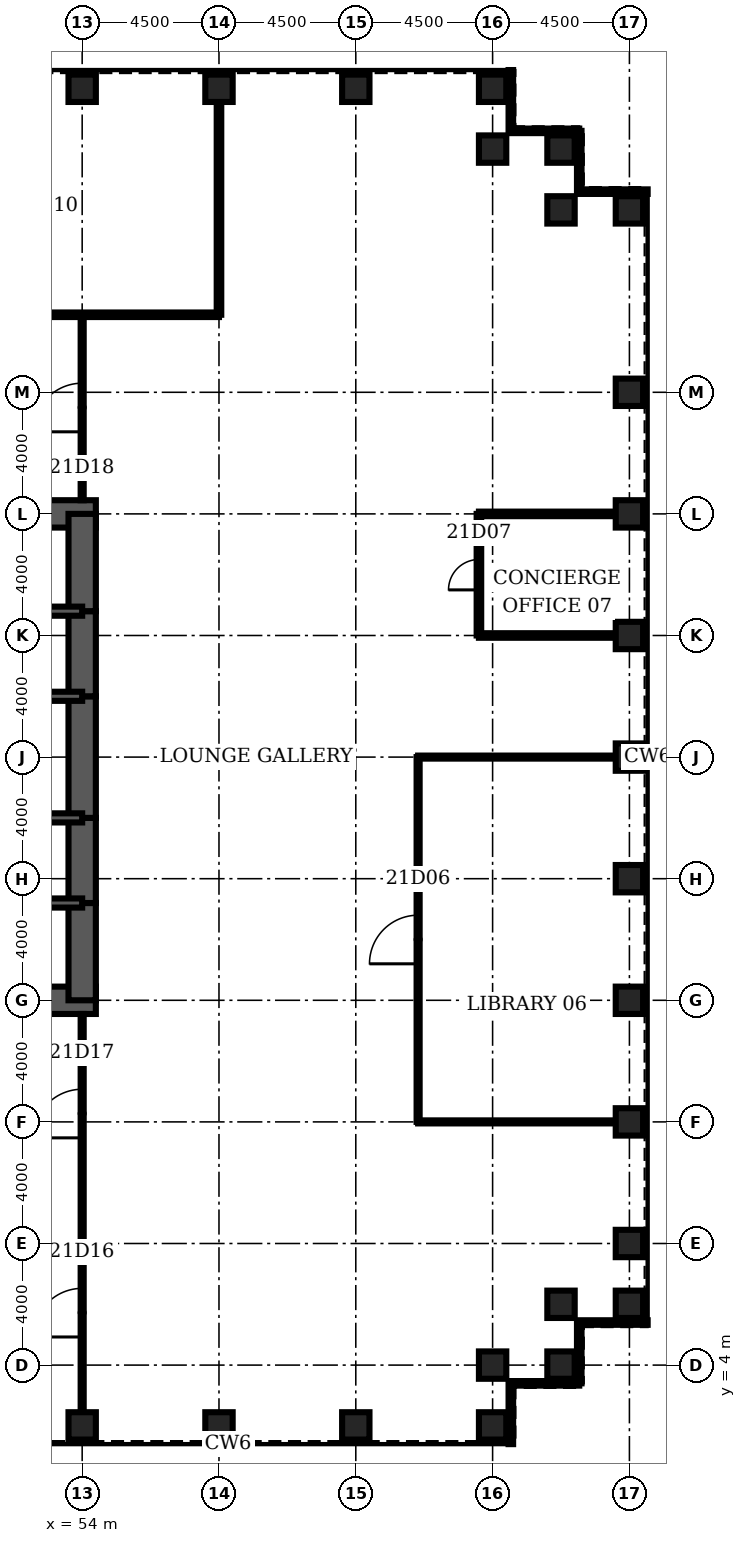
"""IFC4 building model, lengths in metres.
Left out: names, types, materials, properties, quantities, classifications, styles, units other than length and angle.
Written with IfcOpenShell. Run it as: python <this file> out.ifc"""

import sys

from ifc_helpers import new_model, si_unit, direction, frame, frame_2d, origin, origin_2d, place, context, subcontext, project, spatial, rectangle, hollow_rectangle, extrude, element, fill, save


model = new_model("IFC4")
c1 = context("Model", 3, precision=1e-05, world=origin(), true_north=direction((0.0, 1.0)))
c2 = subcontext(c1, "Body", "Model", "MODEL_VIEW")
j1 = project(units=[si_unit("LENGTHUNIT", "METRE"), si_unit("PLANEANGLEUNIT", "RADIAN")], contexts=[c1])
p1 = place(None, origin())
s1 = spatial("IfcSite", under=j1, at=p1, CompositionType="ELEMENT")
p2 = place(p1, origin())
s2 = spatial("IfcBuilding", under=s1, at=p2, CompositionType="ELEMENT")
p3 = place(p2, frame((0.0, 0.0, 100.5)))
s3 = spatial("IfcBuildingStorey", under=s2, at=p3, CompositionType="ELEMENT", Elevation=100.5)
for number, where, z_axis, x_axis in (
    (1, (54.0, 2.0, 0.0), (0.0, 0.0, 1.0), (0.0, 1.0, 0.0)),
    (2, (58.5, 2.0, 0.0), (0.0, 0.0, 1.0), (0.0, 1.0, 0.0)),
    (3, (63.0, 2.0, 0.0), (0.0, 0.0, 1.0), (0.0, 1.0, 0.0)),
    (4, (67.5, 2.0, 0.0), (0.0, 0.0, 1.0), (0.0, 1.0, 0.0)),
    (5, (67.5, 4.0, 0.0), (0.0, 0.0, 1.0), (0.0, 1.0, 0.0)),
    (6, (69.75, 4.0, 0.0), (0.0, 0.0, 1.0), (1.0, 0.0, 0.0)),
    (7, (69.75, 6.0, 0.0), (0.0, 0.0, 1.0), (1.0, 0.0, 0.0)),
    (8, (72.0, 6.0, 0.0), (0.0, 0.0, 1.0), (1.0, 0.0, 0.0)),
    (9, (72.0, 8.0, 0.0), (0.0, 0.0, 1.0), (1.0, 0.0, 0.0)),
    (10, (72.0, 12.0, 0.0), (0.0, 0.0, 1.0), (1.0, 0.0, 0.0)),
    (11, (72.0, 16.0, 0.0), (0.0, 0.0, 1.0), (1.0, 0.0, 0.0)),
    (12, (72.0, 20.0, 0.0), (0.0, 0.0, 1.0), (1.0, 0.0, 0.0)),
    (13, (72.0, 24.0, 0.0), (0.0, 0.0, 1.0), (1.0, 0.0, 0.0)),
    (14, (72.0, 28.0, 0.0), (0.0, 0.0, 1.0), (1.0, 0.0, 0.0)),
    (15, (72.0, 32.0, 0.0), (0.0, 0.0, 1.0), (1.0, 0.0, 0.0)),
    (16, (72.0, 36.0, 0.0), (0.0, 0.0, 1.0), (1.0, 0.0, 0.0)),
    (17, (72.0, 42.0, 0.0), (0.0, 0.0, 1.0), (1.0, 0.0, 0.0)),
    (18, (69.75, 42.0, 0.0), (0.0, 0.0, 1.0), (1.0, 0.0, 0.0)),
    (19, (69.75, 44.0, 0.0), (0.0, 0.0, 1.0), (1.0, 0.0, 0.0)),
    (20, (67.5, 44.0, 0.0), (0.0, 0.0, 1.0), (0.0, 1.0, 0.0)),
    (21, (67.5, 46.0, 0.0), (0.0, 0.0, 1.0), (0.0, 1.0, 0.0)),
    (22, (63.0, 46.0, 0.0), (0.0, 0.0, 1.0), (0.0, 1.0, 0.0)),
    (23, (58.5, 46.0, 0.0), (0.0, 0.0, 1.0), (0.0, 1.0, 0.0)),
    (24, (54.0, 46.0, 0.0), (0.0, 0.0, 1.0), (0.0, 1.0, 0.0)),
):
    element("IfcColumn", number, at=place(p3, frame(where, z_axis=z_axis, x_axis=x_axis)), inside=s3, PredefinedType="COLUMN", context=c2, shape_type="SweptSolid", body=[
        extrude(hollow_rectangle(XDim=0.9, YDim=0.9, WallThickness=0.11, at=origin_2d()), origin(), (0.0, 0.0, 1.0), 4.2),
    ])
for number, where, z_axis, x_axis in (
    (25, (45.0, 16.0, 0.0), (0.0, 0.0, 1.0), (1.0, 0.0, 0.0)),
    (26, (54.45, 32.0, 0.0), (0.0, 0.0, 1.0), (-1.0, 0.0, 0.0)),
):
    element("IfcWall", number, at=place(p3, frame(where, z_axis=z_axis, x_axis=x_axis)), inside=s3, PredefinedType="SHEAR", context=c2, shape_type="SweptSolid", body=[
        extrude(rectangle(XDim=9.45, YDim=0.9, at=frame_2d((4.725, 0.0))), origin(), (0.0, 0.0, 1.0), 4.2),
    ])
p4 = place(p3, frame((54.0, 16.0, 0.0), z_axis=(0.0, 0.0, 1.0), x_axis=(0.0, 1.0, 0.0)))
e27 = element("IfcWall", 27, at=p4, inside=s3, PredefinedType="SHEAR", context=c2, shape_type="SweptSolid", body=[
    extrude(rectangle(XDim=3.2, YDim=0.9, at=frame_2d((1.6, 0.0))), origin(), (0.0, 0.0, 1.0), 4.2),
])
p5 = place(p3, frame((54.0, 19.2, 0.0), z_axis=(0.0, 0.0, 1.0), x_axis=(0.0, 1.0, 0.0)))
e28 = element("IfcWall", 28, at=p5, inside=s3, PredefinedType="SHEAR", context=c2, shape_type="SweptSolid", body=[
    extrude(rectangle(XDim=2.8, YDim=0.9, at=frame_2d((1.4, 0.0))), origin(), (0.0, 0.0, 1.0), 4.2),
])
p6 = place(p5, frame((0.4, 0.0, 0.0)))
e29 = element("IfcOpeningElement", 29, at=p6, cuts=e28, PredefinedType="OPENING", context=c2, shape_type="SweptSolid", body=[
    extrude(rectangle(XDim=1.8, YDim=2.1, at=frame_2d((0.9, 1.05))), frame((0.0, 0.46, 0.0), z_axis=(0.0, -1.0, 0.0), x_axis=(1.0, 0.0, 0.0)), (0.0, 0.0, 1.0), 0.92),
])
p7 = place(p3, frame((54.0, 22.0, 0.0), z_axis=(0.0, 0.0, 1.0), x_axis=(0.0, 1.0, 0.0)))
e30 = element("IfcWall", 30, at=p7, inside=s3, PredefinedType="SHEAR", context=c2, shape_type="SweptSolid", body=[
    extrude(rectangle(XDim=4.0, YDim=0.9, at=frame_2d((2.0, 0.0))), origin(), (0.0, 0.0, 1.0), 4.2),
])
p8 = place(p3, frame((54.0, 26.0, 0.0), z_axis=(0.0, 0.0, 1.0), x_axis=(0.0, 1.0, 0.0)))
e31 = element("IfcWall", 31, at=p8, inside=s3, PredefinedType="SHEAR", context=c2, shape_type="SweptSolid", body=[
    extrude(rectangle(XDim=2.8, YDim=0.9, at=frame_2d((1.4, 0.0))), origin(), (0.0, 0.0, 1.0), 4.2),
])
p9 = place(p8, frame((0.6, 0.0, 0.0)))
e32 = element("IfcOpeningElement", 32, at=p9, cuts=e31, PredefinedType="OPENING", context=c2, shape_type="SweptSolid", body=[
    extrude(rectangle(XDim=1.8, YDim=2.1, at=frame_2d((0.9, 1.05))), frame((0.0, 0.46, 0.0), z_axis=(0.0, -1.0, 0.0), x_axis=(1.0, 0.0, 0.0)), (0.0, 0.0, 1.0), 0.92),
])
p10 = place(p3, frame((54.0, 28.8, 0.0), z_axis=(0.0, 0.0, 1.0), x_axis=(0.0, 1.0, 0.0)))
e33 = element("IfcWall", 33, at=p10, inside=s3, PredefinedType="SHEAR", context=c2, shape_type="SweptSolid", body=[
    extrude(rectangle(XDim=3.2, YDim=0.9, at=frame_2d((1.6, 0.0))), origin(), (0.0, 0.0, 1.0), 4.2),
])
p11 = place(p3, frame((45.0, 19.2, 0.0), z_axis=(0.0, 0.0, 1.0), x_axis=(1.0, 0.0, 0.0)))
e34 = element("IfcWall", 34, at=p11, inside=s3, PredefinedType="SOLIDWALL", context=c2, shape_type="SweptSolid", body=[
    extrude(rectangle(XDim=9.0, YDim=0.3, at=frame_2d((4.5, 0.0))), origin(), (0.0, 0.0, 1.0), 4.2),
])
p12 = place(p11, frame((7.35, 0.0, 0.0)))
e35 = element("IfcOpeningElement", 35, at=p12, cuts=e34, PredefinedType="OPENING", context=c2, shape_type="SweptSolid", body=[
    extrude(rectangle(XDim=1.0, YDim=2.1, at=frame_2d((0.5, 1.05))), frame((0.0, 0.16, 0.0), z_axis=(0.0, -1.0, 0.0), x_axis=(1.0, 0.0, 0.0)), (0.0, 0.0, 1.0), 0.32),
])
p13 = place(p3, frame((45.0, 28.8, 0.0), z_axis=(0.0, 0.0, 1.0), x_axis=(1.0, 0.0, 0.0)))
e36 = element("IfcWall", 36, at=p13, inside=s3, PredefinedType="SOLIDWALL", context=c2, shape_type="SweptSolid", body=[
    extrude(rectangle(XDim=9.0, YDim=0.3, at=frame_2d((4.5, 0.0))), origin(), (0.0, 0.0, 1.0), 4.2),
])
p14 = place(p13, frame((7.35, 0.0, 0.0)))
e37 = element("IfcOpeningElement", 37, at=p14, cuts=e36, PredefinedType="OPENING", context=c2, shape_type="SweptSolid", body=[
    extrude(rectangle(XDim=1.0, YDim=2.1, at=frame_2d((0.5, 1.05))), frame((0.0, 0.16, 0.0), z_axis=(0.0, -1.0, 0.0), x_axis=(1.0, 0.0, 0.0)), (0.0, 0.0, 1.0), 0.32),
])
p15 = place(p3, frame((48.0, 22.0, 0.0), z_axis=(0.0, 0.0, 1.0), x_axis=(1.0, 0.0, 0.0)))
e38 = element("IfcWall", 38, at=p15, inside=s3, PredefinedType="SOLIDWALL", context=c2, shape_type="SweptSolid", body=[
    extrude(rectangle(XDim=6.0, YDim=0.3, at=frame_2d((3.0, 0.0))), origin(), (0.0, 0.0, 1.0), 4.2),
])
p16 = place(p15, frame((2.0, 0.0, 0.0)))
e39 = element("IfcOpeningElement", 39, at=p16, cuts=e38, PredefinedType="OPENING", context=c2, shape_type="SweptSolid", body=[
    extrude(rectangle(XDim=1.0, YDim=2.1, at=frame_2d((0.5, 1.05))), frame((0.0, 0.16, 0.0), z_axis=(0.0, -1.0, 0.0), x_axis=(1.0, 0.0, 0.0)), (0.0, 0.0, 1.0), 0.32),
])
p17 = place(p15, frame((4.3, 0.0, 0.0)))
e40 = element("IfcOpeningElement", 40, at=p17, cuts=e38, PredefinedType="OPENING", context=c2, shape_type="SweptSolid", body=[
    extrude(rectangle(XDim=1.0, YDim=2.1, at=frame_2d((0.5, 1.05))), frame((0.0, 0.16, 0.0), z_axis=(0.0, -1.0, 0.0), x_axis=(1.0, 0.0, 0.0)), (0.0, 0.0, 1.0), 0.32),
])
p18 = place(p3, frame((48.0, 26.0, 0.0), z_axis=(0.0, 0.0, 1.0), x_axis=(1.0, 0.0, 0.0)))
e41 = element("IfcWall", 41, at=p18, inside=s3, PredefinedType="SOLIDWALL", context=c2, shape_type="SweptSolid", body=[
    extrude(rectangle(XDim=6.0, YDim=0.3, at=frame_2d((3.0, 0.0))), origin(), (0.0, 0.0, 1.0), 4.2),
])
for number, where, z_axis, x_axis in (
    (42, (65.05, 12.0, 0.0), (0.0, 0.0, 1.0), (1.0, 0.0, 0.0)),
    (43, (65.05, 24.0, 0.0), (0.0, 0.0, 1.0), (1.0, 0.0, 0.0)),
):
    element("IfcWall", number, at=place(p3, frame(where, z_axis=z_axis, x_axis=x_axis)), inside=s3, PredefinedType="PARTITIONING", context=c2, shape_type="SweptSolid", body=[
        extrude(rectangle(XDim=6.5, YDim=0.1, at=frame_2d((3.25, 0.0))), origin(), (0.0, 0.0, 1.0), 3.0),
    ])
for number, where, z_axis, x_axis in (
    (44, (67.05, 28.0, 0.0), (0.0, 0.0, 1.0), (1.0, 0.0, 0.0)),
    (45, (67.05, 32.0, 0.0), (0.0, 0.0, 1.0), (1.0, 0.0, 0.0)),
):
    element("IfcWall", number, at=place(p3, frame(where, z_axis=z_axis, x_axis=x_axis)), inside=s3, PredefinedType="PARTITIONING", context=c2, shape_type="SweptSolid", body=[
        extrude(rectangle(XDim=4.5, YDim=0.15, at=frame_2d((2.25, 0.0))), origin(), (0.0, 0.0, 1.0), 3.0),
    ])
p19 = place(p3, frame((45.0, 38.55, 0.0), z_axis=(0.0, 0.0, 1.0), x_axis=(1.0, 0.0, 0.0)))
e46 = element("IfcWall", 46, at=p19, inside=s3, PredefinedType="PARTITIONING", context=c2, shape_type="SweptSolid", body=[
    extrude(rectangle(XDim=13.5, YDim=0.15, at=frame_2d((6.75, 0.0))), origin(), (0.0, 0.0, 1.0), 3.0),
])
p20 = place(p19, frame((5.95, 0.0, 0.0)))
e47 = element("IfcOpeningElement", 47, at=p20, cuts=e46, PredefinedType="OPENING", context=c2, shape_type="SweptSolid", body=[
    extrude(rectangle(XDim=1.6, YDim=2.1, at=frame_2d((0.8, 1.05))), frame((0.0, 0.085, 0.0), z_axis=(0.0, -1.0, 0.0), x_axis=(1.0, 0.0, 0.0)), (0.0, 0.0, 1.0), 0.17),
])
p21 = place(p3, frame((54.0, 2.45, 0.0), z_axis=(0.0, 0.0, 1.0), x_axis=(0.0, 1.0, 0.0)))
e48 = element("IfcWall", 48, at=p21, inside=s3, PredefinedType="PARTITIONING", context=c2, shape_type="SweptSolid", body=[
    extrude(rectangle(XDim=13.1, YDim=0.1, at=frame_2d((6.55, 0.0))), origin(), (0.0, 0.0, 1.0), 3.0),
])
p22 = place(p21, frame((2.475, 0.0, 0.0)))
e49 = element("IfcOpeningElement", 49, at=p22, cuts=e48, PredefinedType="OPENING", context=c2, shape_type="SweptSolid", body=[
    extrude(rectangle(XDim=1.6, YDim=2.1, at=frame_2d((0.8, 1.05))), frame((0.0, 0.06, 0.0), z_axis=(0.0, -1.0, 0.0), x_axis=(1.0, 0.0, 0.0)), (0.0, 0.0, 1.0), 0.12),
])
p23 = place(p21, frame((9.025, 0.0, 0.0)))
e50 = element("IfcOpeningElement", 50, at=p23, cuts=e48, PredefinedType="OPENING", context=c2, shape_type="SweptSolid", body=[
    extrude(rectangle(XDim=1.6, YDim=2.1, at=frame_2d((0.8, 1.05))), frame((0.0, 0.06, 0.0), z_axis=(0.0, -1.0, 0.0), x_axis=(1.0, 0.0, 0.0)), (0.0, 0.0, 1.0), 0.12),
])
p24 = place(p3, frame((54.0, 32.45, 0.0), z_axis=(0.0, 0.0, 1.0), x_axis=(0.0, 1.0, 0.0)))
e51 = element("IfcWall", 51, at=p24, inside=s3, PredefinedType="PARTITIONING", context=c2, shape_type="SweptSolid", body=[
    extrude(rectangle(XDim=6.1, YDim=0.1, at=frame_2d((3.05, 0.0))), origin(), (0.0, 0.0, 1.0), 3.0),
])
p25 = place(p24, frame((2.25, 0.0, 0.0)))
e52 = element("IfcOpeningElement", 52, at=p25, cuts=e51, PredefinedType="OPENING", context=c2, shape_type="SweptSolid", body=[
    extrude(rectangle(XDim=1.6, YDim=2.1, at=frame_2d((0.8, 1.05))), frame((0.0, 0.06, 0.0), z_axis=(0.0, -1.0, 0.0), x_axis=(1.0, 0.0, 0.0)), (0.0, 0.0, 1.0), 0.12),
])
p26 = place(p3, frame((58.5, 38.55, 0.0), z_axis=(0.0, 0.0, 1.0), x_axis=(0.0, 1.0, 0.0)))
e53 = element("IfcWall", 53, at=p26, inside=s3, PredefinedType="PARTITIONING", context=c2, shape_type="SweptSolid", body=[
    extrude(rectangle(XDim=7.0, YDim=0.15, at=frame_2d((3.5, 0.0))), origin(), (0.0, 0.0, 1.0), 3.0),
])
p27 = place(p3, frame((65.05, 12.0, 0.0), z_axis=(0.0, 0.0, 1.0), x_axis=(0.0, 1.0, 0.0)))
e54 = element("IfcWall", 54, at=p27, inside=s3, PredefinedType="PARTITIONING", context=c2, shape_type="SweptSolid", body=[
    extrude(rectangle(XDim=12.0, YDim=0.1, at=frame_2d((6.0, 0.0))), origin(), (0.0, 0.0, 1.0), 3.0),
])
p28 = place(p27, frame((5.2, 0.0, 0.0)))
e55 = element("IfcOpeningElement", 55, at=p28, cuts=e54, PredefinedType="OPENING", context=c2, shape_type="SweptSolid", body=[
    extrude(rectangle(XDim=1.6, YDim=2.1, at=frame_2d((0.8, 1.05))), frame((0.0, 0.06, 0.0), z_axis=(0.0, -1.0, 0.0), x_axis=(1.0, 0.0, 0.0)), (0.0, 0.0, 1.0), 0.12),
])
p29 = place(p3, frame((67.05, 28.0, 0.0), z_axis=(0.0, 0.0, 1.0), x_axis=(0.0, 1.0, 0.0)))
e56 = element("IfcWall", 56, at=p29, inside=s3, PredefinedType="PARTITIONING", context=c2, shape_type="SweptSolid", body=[
    extrude(rectangle(XDim=4.0, YDim=0.15, at=frame_2d((2.0, 0.0))), origin(), (0.0, 0.0, 1.0), 3.0),
])
p30 = place(p29, frame((1.5, 0.0, 0.0)))
e57 = element("IfcOpeningElement", 57, at=p30, cuts=e56, PredefinedType="OPENING", context=c2, shape_type="SweptSolid", body=[
    extrude(rectangle(XDim=1.0, YDim=2.1, at=frame_2d((0.5, 1.05))), frame((0.0, 0.085, 0.0), z_axis=(0.0, -1.0, 0.0), x_axis=(1.0, 0.0, 0.0)), (0.0, 0.0, 1.0), 0.17),
])
p31 = place(p3, frame((68.1, 1.4, 0.0), z_axis=(0.0, 0.0, 1.0), x_axis=(0.0, 1.0, 0.0)))
e58 = element("IfcWall", 58, at=p31, inside=s3, PredefinedType="ELEMENTEDWALL", context=c2, shape_type="SweptSolid", body=[
    extrude(rectangle(XDim=2.0, YDim=0.15, at=frame_2d((1.0, 0.0))), origin(), (0.0, 0.0, 1.0), 4.04),
])
p32 = place(p3, frame((68.1, 3.4, 0.0), z_axis=(0.0, 0.0, 1.0), x_axis=(1.0, 0.0, 0.0)))
e59 = element("IfcWall", 59, at=p32, inside=s3, PredefinedType="ELEMENTEDWALL", context=c2, shape_type="SweptSolid", body=[
    extrude(rectangle(XDim=2.25, YDim=0.15, at=frame_2d((1.125, 0.0))), origin(), (0.0, 0.0, 1.0), 4.04),
])
p33 = place(p3, frame((70.35, 3.4, 0.0), z_axis=(0.0, 0.0, 1.0), x_axis=(0.0, 1.0, 0.0)))
e60 = element("IfcWall", 60, at=p33, inside=s3, PredefinedType="ELEMENTEDWALL", context=c2, shape_type="SweptSolid", body=[
    extrude(rectangle(XDim=2.0, YDim=0.15, at=frame_2d((1.0, 0.0))), origin(), (0.0, 0.0, 1.0), 4.04),
])
for number, where, z_axis, x_axis in (
    (61, (70.35, 5.4, 0.0), (0.0, 0.0, 1.0), (1.0, 0.0, 0.0)),
    (62, (72.6, 42.6, 0.0), (0.0, 0.0, 1.0), (-1.0, 0.0, 0.0)),
):
    element("IfcWall", number, at=place(p3, frame(where, z_axis=z_axis, x_axis=x_axis)), inside=s3, PredefinedType="ELEMENTEDWALL", context=c2, shape_type="SweptSolid", body=[
        extrude(rectangle(XDim=2.25, YDim=0.15, at=frame_2d((1.125, 0.0))), origin(), (0.0, 0.0, 1.0), 4.04),
    ])
p34 = place(p3, frame((70.35, 42.6, 0.0), z_axis=(0.0, 0.0, 1.0), x_axis=(0.0, 1.0, 0.0)))
e63 = element("IfcWall", 63, at=p34, inside=s3, PredefinedType="ELEMENTEDWALL", context=c2, shape_type="SweptSolid", body=[
    extrude(rectangle(XDim=2.0, YDim=0.15, at=frame_2d((1.0, 0.0))), origin(), (0.0, 0.0, 1.0), 4.04),
])
p35 = place(p3, frame((70.35, 44.6, 0.0), z_axis=(0.0, 0.0, 1.0), x_axis=(-1.0, 0.0, 0.0)))
e64 = element("IfcWall", 64, at=p35, inside=s3, PredefinedType="ELEMENTEDWALL", context=c2, shape_type="SweptSolid", body=[
    extrude(rectangle(XDim=2.25, YDim=0.15, at=frame_2d((1.125, 0.0))), origin(), (0.0, 0.0, 1.0), 4.04),
])
p36 = place(p3, frame((68.1, 44.6, 0.0), z_axis=(0.0, 0.0, 1.0), x_axis=(0.0, 1.0, 0.0)))
e65 = element("IfcWall", 65, at=p36, inside=s3, PredefinedType="ELEMENTEDWALL", context=c2, shape_type="SweptSolid", body=[
    extrude(rectangle(XDim=2.0, YDim=0.15, at=frame_2d((1.0, 0.0))), origin(), (0.0, 0.0, 1.0), 4.04),
])
p37 = place(p28, origin())
e66 = element("IfcDoor", 66, at=p37, inside=s3, OperationType="SINGLE_SWING_LEFT", PredefinedType="DOOR", context=c2, shape_type="SweptSolid", body=[
    extrude(rectangle(XDim=1.6, YDim=2.1, at=frame_2d((0.8, 1.05))), frame((0.0, 0.025, 0.0), z_axis=(0.0, -1.0, 0.0), x_axis=(1.0, 0.0, 0.0)), (0.0, 0.0, 1.0), 0.05),
])
fill(e55, e66)
p38 = place(p30, origin())
e67 = element("IfcDoor", 67, at=p38, inside=s3, OperationType="SINGLE_SWING_LEFT", PredefinedType="DOOR", context=c2, shape_type="SweptSolid", body=[
    extrude(rectangle(XDim=1.0, YDim=2.1, at=frame_2d((0.5, 1.05))), frame((0.0, 0.025, 0.0), z_axis=(0.0, -1.0, 0.0), x_axis=(1.0, 0.0, 0.0)), (0.0, 0.0, 1.0), 0.05),
])
fill(e57, e67)
p39 = place(p22, origin())
e68 = element("IfcDoor", 68, at=p39, inside=s3, OperationType="SINGLE_SWING_LEFT", PredefinedType="DOOR", context=c2, shape_type="SweptSolid", body=[
    extrude(rectangle(XDim=1.6, YDim=2.1, at=frame_2d((0.8, 1.05))), frame((0.0, 0.025, 0.0), z_axis=(0.0, -1.0, 0.0), x_axis=(1.0, 0.0, 0.0)), (0.0, 0.0, 1.0), 0.05),
])
fill(e49, e68)
p40 = place(p23, origin())
e69 = element("IfcDoor", 69, at=p40, inside=s3, OperationType="SINGLE_SWING_LEFT", PredefinedType="DOOR", context=c2, shape_type="SweptSolid", body=[
    extrude(rectangle(XDim=1.6, YDim=2.1, at=frame_2d((0.8, 1.05))), frame((0.0, 0.025, 0.0), z_axis=(0.0, -1.0, 0.0), x_axis=(1.0, 0.0, 0.0)), (0.0, 0.0, 1.0), 0.05),
])
fill(e50, e69)
p41 = place(p25, origin())
e70 = element("IfcDoor", 70, at=p41, inside=s3, OperationType="SINGLE_SWING_LEFT", PredefinedType="DOOR", context=c2, shape_type="SweptSolid", body=[
    extrude(rectangle(XDim=1.6, YDim=2.1, at=frame_2d((0.8, 1.05))), frame((0.0, 0.025, 0.0), z_axis=(0.0, -1.0, 0.0), x_axis=(1.0, 0.0, 0.0)), (0.0, 0.0, 1.0), 0.05),
])
fill(e52, e70)
p42 = place(p12, origin())
e71 = element("IfcDoor", 71, at=p42, inside=s3, OperationType="SINGLE_SWING_RIGHT", PredefinedType="DOOR", context=c2, shape_type="SweptSolid", body=[
    extrude(rectangle(XDim=1.0, YDim=2.1, at=frame_2d((0.5, 1.05))), frame((0.0, 0.025, 0.0), z_axis=(0.0, -1.0, 0.0), x_axis=(1.0, 0.0, 0.0)), (0.0, 0.0, 1.0), 0.05),
])
fill(e35, e71)
p43 = place(p14, origin())
e72 = element("IfcDoor", 72, at=p43, inside=s3, OperationType="SINGLE_SWING_RIGHT", PredefinedType="DOOR", context=c2, shape_type="SweptSolid", body=[
    extrude(rectangle(XDim=1.0, YDim=2.1, at=frame_2d((0.5, 1.05))), frame((0.0, 0.025, 0.0), z_axis=(0.0, -1.0, 0.0), x_axis=(1.0, 0.0, 0.0)), (0.0, 0.0, 1.0), 0.05),
])
fill(e37, e72)
p44 = place(p6, origin())
e73 = element("IfcDoor", 73, at=p44, inside=s3, OperationType="SINGLE_SWING_LEFT", PredefinedType="DOOR", context=c2, shape_type="SweptSolid", body=[
    extrude(rectangle(XDim=1.8, YDim=2.1, at=frame_2d((0.9, 1.05))), frame((0.0, 0.45, 0.0), z_axis=(0.0, -1.0, 0.0), x_axis=(1.0, 0.0, 0.0)), (0.0, 0.0, 1.0), 0.899),
])
fill(e29, e73)
p45 = place(p9, origin())
e74 = element("IfcDoor", 74, at=p45, inside=s3, OperationType="SINGLE_SWING_LEFT", PredefinedType="DOOR", context=c2, shape_type="SweptSolid", body=[
    extrude(rectangle(XDim=1.8, YDim=2.1, at=frame_2d((0.9, 1.05))), frame((0.0, 0.45, 0.0), z_axis=(0.0, -1.0, 0.0), x_axis=(1.0, 0.0, 0.0)), (0.0, 0.0, 1.0), 0.899),
])
fill(e32, e74)
p46 = place(p17, origin())
e75 = element("IfcDoor", 75, at=p46, inside=s3, OperationType="SINGLE_SWING_RIGHT", PredefinedType="DOOR", context=c2, shape_type="SweptSolid", body=[
    extrude(rectangle(XDim=1.0, YDim=2.1, at=frame_2d((0.5, 1.05))), frame((0.0, 0.025, 0.0), z_axis=(0.0, -1.0, 0.0), x_axis=(1.0, 0.0, 0.0)), (0.0, 0.0, 1.0), 0.05),
])
fill(e40, e75)
save(model, sys.argv[1])
